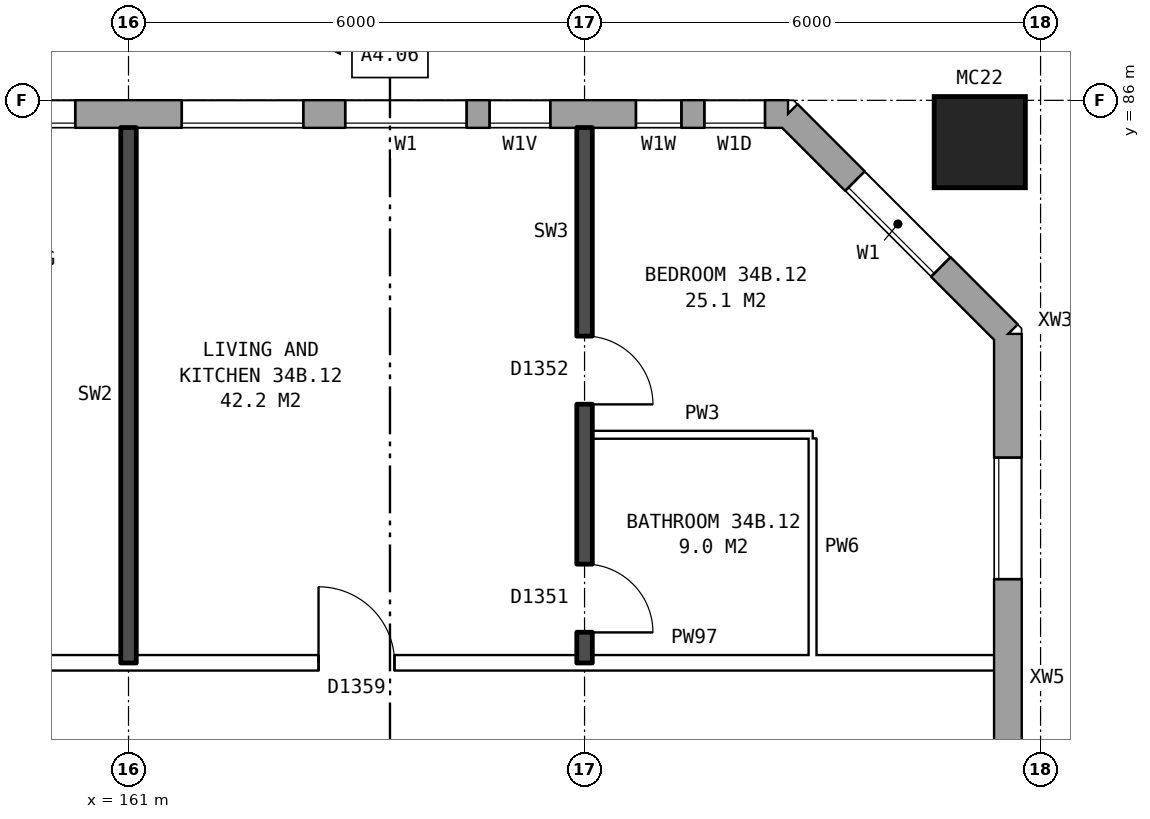
"""IFC4 building model, lengths in metres.
Left out: names, types, materials, properties, quantities, classifications, styles, units other than length and angle.
Written with IfcOpenShell. Run it as: python <this file> out.ifc"""

import sys

from ifc_helpers import new_model, si_unit, direction, frame, frame_2d, origin, origin_2d, place, context, subcontext, project, spatial, rectangle, hollow_rectangle, extrude, element, fill, save


model = new_model("IFC4")
c1 = context("Model", 3, precision=1e-05, world=origin(), true_north=direction((0.0, 1.0)))
c2 = subcontext(c1, "Body", "Model", "MODEL_VIEW")
j1 = project(units=[si_unit("LENGTHUNIT", "METRE"), si_unit("PLANEANGLEUNIT", "RADIAN")], contexts=[c1])
p1 = place(None, origin())
s1 = spatial("IfcSite", under=j1, at=p1, CompositionType="ELEMENT")
p2 = place(p1, origin())
s2 = spatial("IfcBuilding", under=s1, at=p2, CompositionType="ELEMENT")
p3 = place(p2, frame((0.0, 0.0, 123.7)))
s3 = spatial("IfcBuildingStorey", under=s2, at=p3, CompositionType="ELEMENT", Elevation=123.7)
p4 = place(p3, frame((172.2, 85.45, 0.0), z_axis=(0.0, 0.0, 1.0), x_axis=(1.0, 0.0, 0.0)))
e1 = element("IfcColumn", 1, at=p4, inside=s3, PredefinedType="COLUMN", context=c2, shape_type="SweptSolid", body=[
    extrude(hollow_rectangle(XDim=1.2, YDim=1.2, WallThickness=0.065, at=origin_2d()), origin(), (0.0, 0.0, 1.0), 3.1),
])
p5 = place(p3, frame((172.57, 57.075, 0.0), z_axis=(0.0, 0.0, 1.0), x_axis=(0.0, 1.0, 0.0)))
e2 = element("IfcWall", 2, at=p5, inside=s3, PredefinedType="STANDARD", context=c2, shape_type="SweptSolid", body=[
    extrude(rectangle(XDim=25.851, YDim=0.36, at=frame_2d((12.925, 0.0))), origin(), (0.0, 0.0, 1.0), 2.85),
])
p6 = place(p5, frame((1.625, 0.0, 0.8)))
e3 = element("IfcOpeningElement", 3, at=p6, cuts=e2, PredefinedType="OPENING", context=c2, shape_type="SweptSolid", body=[
    extrude(rectangle(XDim=1.6, YDim=1.8, at=frame_2d((0.8, 0.9))), frame((0.0, 0.19, 0.0), z_axis=(0.0, -1.0, 0.0), x_axis=(1.0, 0.0, 0.0)), (0.0, 0.0, 1.0), 0.38),
])
p7 = place(p5, frame((5.775, 0.0, 0.8)))
e4 = element("IfcOpeningElement", 4, at=p7, cuts=e2, PredefinedType="OPENING", context=c2, shape_type="SweptSolid", body=[
    extrude(rectangle(XDim=0.6, YDim=0.9, at=frame_2d((0.3, 0.45))), frame((0.0, 0.19, 0.0), z_axis=(0.0, -1.0, 0.0), x_axis=(1.0, 0.0, 0.0)), (0.0, 0.0, 1.0), 0.38),
])
p8 = place(p5, frame((7.625, 0.0, 0.8)))
e5 = element("IfcOpeningElement", 5, at=p8, cuts=e2, PredefinedType="OPENING", context=c2, shape_type="SweptSolid", body=[
    extrude(rectangle(XDim=1.6, YDim=1.8, at=frame_2d((0.8, 0.9))), frame((0.0, 0.19, 0.0), z_axis=(0.0, -1.0, 0.0), x_axis=(1.0, 0.0, 0.0)), (0.0, 0.0, 1.0), 0.38),
])
p9 = place(p5, frame((10.625, 0.0, 0.8)))
e6 = element("IfcOpeningElement", 6, at=p9, cuts=e2, PredefinedType="OPENING", context=c2, shape_type="SweptSolid", body=[
    extrude(rectangle(XDim=1.6, YDim=1.8, at=frame_2d((0.8, 0.9))), frame((0.0, 0.19, 0.0), z_axis=(0.0, -1.0, 0.0), x_axis=(1.0, 0.0, 0.0)), (0.0, 0.0, 1.0), 0.38),
])
p10 = place(p5, frame((13.625, 0.0, 0.8)))
e7 = element("IfcOpeningElement", 7, at=p10, cuts=e2, PredefinedType="OPENING", context=c2, shape_type="SweptSolid", body=[
    extrude(rectangle(XDim=1.6, YDim=1.8, at=frame_2d((0.8, 0.9))), frame((0.0, 0.19, 0.0), z_axis=(0.0, -1.0, 0.0), x_axis=(1.0, 0.0, 0.0)), (0.0, 0.0, 1.0), 0.38),
])
p11 = place(p5, frame((16.625, 0.0, 0.8)))
e8 = element("IfcOpeningElement", 8, at=p11, cuts=e2, PredefinedType="OPENING", context=c2, shape_type="SweptSolid", body=[
    extrude(rectangle(XDim=1.6, YDim=1.8, at=frame_2d((0.8, 0.9))), frame((0.0, 0.19, 0.0), z_axis=(0.0, -1.0, 0.0), x_axis=(1.0, 0.0, 0.0)), (0.0, 0.0, 1.0), 0.38),
])
p12 = place(p5, frame((6.675, 0.0, 0.8)))
e9 = element("IfcOpeningElement", 9, at=p12, cuts=e2, PredefinedType="OPENING", context=c2, shape_type="SweptSolid", body=[
    extrude(rectangle(XDim=0.6, YDim=1.5, at=frame_2d((0.3, 0.75))), frame((0.0, 0.19, 0.0), z_axis=(0.0, -1.0, 0.0), x_axis=(1.0, 0.0, 0.0)), (0.0, 0.0, 1.0), 0.38),
])
p13 = place(p5, frame((22.625, 0.0, 0.8)))
e10 = element("IfcOpeningElement", 10, at=p13, cuts=e2, PredefinedType="OPENING", context=c2, shape_type="SweptSolid", body=[
    extrude(rectangle(XDim=1.6, YDim=1.8, at=frame_2d((0.8, 0.9))), frame((0.0, 0.19, 0.0), z_axis=(0.0, -1.0, 0.0), x_axis=(1.0, 0.0, 0.0)), (0.0, 0.0, 1.0), 0.38),
])
p14 = place(p5, frame((9.525, 0.0, 0.8)))
e11 = element("IfcOpeningElement", 11, at=p14, cuts=e2, PredefinedType="OPENING", context=c2, shape_type="SweptSolid", body=[
    extrude(rectangle(XDim=0.8, YDim=1.8, at=frame_2d((0.4, 0.9))), frame((0.0, 0.19, 0.0), z_axis=(0.0, -1.0, 0.0), x_axis=(1.0, 0.0, 0.0)), (0.0, 0.0, 1.0), 0.38),
])
p15 = place(p5, frame((12.525, 0.0, 0.8)))
e12 = element("IfcOpeningElement", 12, at=p15, cuts=e2, PredefinedType="OPENING", context=c2, shape_type="SweptSolid", body=[
    extrude(rectangle(XDim=0.8, YDim=1.8, at=frame_2d((0.4, 0.9))), frame((0.0, 0.19, 0.0), z_axis=(0.0, -1.0, 0.0), x_axis=(1.0, 0.0, 0.0)), (0.0, 0.0, 1.0), 0.38),
])
p16 = place(p5, frame((15.525, 0.0, 0.8)))
e13 = element("IfcOpeningElement", 13, at=p16, cuts=e2, PredefinedType="OPENING", context=c2, shape_type="SweptSolid", body=[
    extrude(rectangle(XDim=0.8, YDim=1.8, at=frame_2d((0.4, 0.9))), frame((0.0, 0.19, 0.0), z_axis=(0.0, -1.0, 0.0), x_axis=(1.0, 0.0, 0.0)), (0.0, 0.0, 1.0), 0.38),
])
p17 = place(p5, frame((18.525, 0.0, 0.8)))
e14 = element("IfcOpeningElement", 14, at=p17, cuts=e2, PredefinedType="OPENING", context=c2, shape_type="SweptSolid", body=[
    extrude(rectangle(XDim=0.6, YDim=1.5, at=frame_2d((0.3, 0.75))), frame((0.0, 0.19, 0.0), z_axis=(0.0, -1.0, 0.0), x_axis=(1.0, 0.0, 0.0)), (0.0, 0.0, 1.0), 0.38),
])
p18 = place(p5, frame((19.425, 0.0, 0.8)))
e15 = element("IfcOpeningElement", 15, at=p18, cuts=e2, PredefinedType="OPENING", context=c2, shape_type="SweptSolid", body=[
    extrude(rectangle(XDim=0.6, YDim=0.9, at=frame_2d((0.3, 0.45))), frame((0.0, 0.19, 0.0), z_axis=(0.0, -1.0, 0.0), x_axis=(1.0, 0.0, 0.0)), (0.0, 0.0, 1.0), 0.38),
])
p19 = place(p3, frame((172.57, 82.925, 0.0), z_axis=(0.0, 0.0, 1.0), x_axis=(-0.707106781187, 0.707106781187, 0.0)))
e16 = element("IfcWall", 16, at=p19, inside=s3, PredefinedType="STANDARD", context=c2, shape_type="SweptSolid", body=[
    extrude(rectangle(XDim=4.094, YDim=0.36, at=frame_2d((2.047, 0.0))), origin(), (0.0, 0.0, 1.0), 2.85),
])
p20 = place(p19, frame((1.247, 0.0, 0.8)))
e17 = element("IfcOpeningElement", 17, at=p20, cuts=e16, PredefinedType="OPENING", context=c2, shape_type="SweptSolid", body=[
    extrude(rectangle(XDim=1.6, YDim=1.8, at=frame_2d((0.8, 0.9))), frame((0.0, 0.19, 0.0), z_axis=(0.0, -1.0, 0.0), x_axis=(1.0, 0.0, 0.0)), (0.0, 0.0, 1.0), 0.38),
])
p21 = place(p3, frame((169.675, 85.82, 0.0), z_axis=(0.0, 0.0, 1.0), x_axis=(-1.0, 0.0, 0.0)))
e18 = element("IfcWall", 18, at=p21, inside=s3, PredefinedType="STANDARD", context=c2, shape_type="SweptSolid", body=[
    extrude(rectangle(XDim=35.601, YDim=0.36, at=frame_2d((17.8, 0.0))), origin(), (0.0, 0.0, 1.0), 2.85),
])
p22 = place(p21, frame((0.3, 0.0, 0.8)))
e19 = element("IfcOpeningElement", 19, at=p22, cuts=e18, PredefinedType="OPENING", context=c2, shape_type="SweptSolid", body=[
    extrude(rectangle(XDim=0.8, YDim=1.8, at=frame_2d((0.4, 0.9))), frame((0.0, 0.19, 0.0), z_axis=(0.0, -1.0, 0.0), x_axis=(1.0, 0.0, 0.0)), (0.0, 0.0, 1.0), 0.38),
])
p23 = place(p21, frame((3.125, 0.0, 0.8)))
e20 = element("IfcOpeningElement", 20, at=p23, cuts=e18, PredefinedType="OPENING", context=c2, shape_type="SweptSolid", body=[
    extrude(rectangle(XDim=0.8, YDim=0.9, at=frame_2d((0.4, 0.45))), frame((0.0, 0.19, 0.0), z_axis=(0.0, -1.0, 0.0), x_axis=(1.0, 0.0, 0.0)), (0.0, 0.0, 1.0), 0.38),
])
p24 = place(p21, frame((6.375, 0.0, 0.8)))
e21 = element("IfcOpeningElement", 21, at=p24, cuts=e18, PredefinedType="OPENING", context=c2, shape_type="SweptSolid", body=[
    extrude(rectangle(XDim=1.6, YDim=1.8, at=frame_2d((0.8, 0.9))), frame((0.0, 0.19, 0.0), z_axis=(0.0, -1.0, 0.0), x_axis=(1.0, 0.0, 0.0)), (0.0, 0.0, 1.0), 0.38),
])
p25 = place(p21, frame((9.375, 0.0, 0.8)))
e22 = element("IfcOpeningElement", 22, at=p25, cuts=e18, PredefinedType="OPENING", context=c2, shape_type="SweptSolid", body=[
    extrude(rectangle(XDim=1.6, YDim=1.8, at=frame_2d((0.8, 0.9))), frame((0.0, 0.19, 0.0), z_axis=(0.0, -1.0, 0.0), x_axis=(1.0, 0.0, 0.0)), (0.0, 0.0, 1.0), 0.38),
])
p26 = place(p21, frame((12.375, 0.0, 0.8)))
e23 = element("IfcOpeningElement", 23, at=p26, cuts=e18, PredefinedType="OPENING", context=c2, shape_type="SweptSolid", body=[
    extrude(rectangle(XDim=1.6, YDim=1.8, at=frame_2d((0.8, 0.9))), frame((0.0, 0.19, 0.0), z_axis=(0.0, -1.0, 0.0), x_axis=(1.0, 0.0, 0.0)), (0.0, 0.0, 1.0), 0.38),
])
p27 = place(p21, frame((15.375, 0.0, 0.8)))
e24 = element("IfcOpeningElement", 24, at=p27, cuts=e18, PredefinedType="OPENING", context=c2, shape_type="SweptSolid", body=[
    extrude(rectangle(XDim=1.6, YDim=1.8, at=frame_2d((0.8, 0.9))), frame((0.0, 0.19, 0.0), z_axis=(0.0, -1.0, 0.0), x_axis=(1.0, 0.0, 0.0)), (0.0, 0.0, 1.0), 0.38),
])
p28 = place(p21, frame((18.375, 0.0, 0.8)))
e25 = element("IfcOpeningElement", 25, at=p28, cuts=e18, PredefinedType="OPENING", context=c2, shape_type="SweptSolid", body=[
    extrude(rectangle(XDim=1.6, YDim=1.8, at=frame_2d((0.8, 0.9))), frame((0.0, 0.19, 0.0), z_axis=(0.0, -1.0, 0.0), x_axis=(1.0, 0.0, 0.0)), (0.0, 0.0, 1.0), 0.38),
])
p29 = place(p21, frame((21.375, 0.0, 0.8)))
e26 = element("IfcOpeningElement", 26, at=p29, cuts=e18, PredefinedType="OPENING", context=c2, shape_type="SweptSolid", body=[
    extrude(rectangle(XDim=1.6, YDim=1.8, at=frame_2d((0.8, 0.9))), frame((0.0, 0.19, 0.0), z_axis=(0.0, -1.0, 0.0), x_axis=(1.0, 0.0, 0.0)), (0.0, 0.0, 1.0), 0.38),
])
p30 = place(p21, frame((24.375, 0.0, 0.8)))
e27 = element("IfcOpeningElement", 27, at=p30, cuts=e18, PredefinedType="OPENING", context=c2, shape_type="SweptSolid", body=[
    extrude(rectangle(XDim=1.6, YDim=1.8, at=frame_2d((0.8, 0.9))), frame((0.0, 0.19, 0.0), z_axis=(0.0, -1.0, 0.0), x_axis=(1.0, 0.0, 0.0)), (0.0, 0.0, 1.0), 0.38),
])
p31 = place(p21, frame((27.375, 0.0, 0.8)))
e28 = element("IfcOpeningElement", 28, at=p31, cuts=e18, PredefinedType="OPENING", context=c2, shape_type="SweptSolid", body=[
    extrude(rectangle(XDim=1.6, YDim=1.8, at=frame_2d((0.8, 0.9))), frame((0.0, 0.19, 0.0), z_axis=(0.0, -1.0, 0.0), x_axis=(1.0, 0.0, 0.0)), (0.0, 0.0, 1.0), 0.38),
])
p32 = place(p21, frame((29.275, 0.0, 0.8)))
e29 = element("IfcOpeningElement", 29, at=p32, cuts=e18, PredefinedType="OPENING", context=c2, shape_type="SweptSolid", body=[
    extrude(rectangle(XDim=1.4, YDim=1.8, at=frame_2d((0.7, 0.9))), frame((0.0, 0.19, 0.0), z_axis=(0.0, -1.0, 0.0), x_axis=(1.0, 0.0, 0.0)), (0.0, 0.0, 1.0), 0.38),
])
p33 = place(p21, frame((33.525, 0.0, 1.7)))
e30 = element("IfcOpeningElement", 30, at=p33, cuts=e18, PredefinedType="OPENING", context=c2, shape_type="SweptSolid", body=[
    extrude(rectangle(XDim=0.6, YDim=0.9, at=frame_2d((0.3, 0.45))), frame((0.0, 0.19, 0.0), z_axis=(0.0, -1.0, 0.0), x_axis=(1.0, 0.0, 0.0)), (0.0, 0.0, 1.0), 0.38),
])
p34 = place(p21, frame((1.4, 0.0, 1.6)))
e31 = element("IfcOpeningElement", 31, at=p34, cuts=e18, PredefinedType="OPENING", context=c2, shape_type="SweptSolid", body=[
    extrude(rectangle(XDim=0.6, YDim=0.9, at=frame_2d((0.3, 0.45))), frame((0.0, 0.19, 0.0), z_axis=(0.0, -1.0, 0.0), x_axis=(1.0, 0.0, 0.0)), (0.0, 0.0, 1.0), 0.38),
])
p35 = place(p21, frame((4.225, 0.0, 0.8)))
e32 = element("IfcOpeningElement", 32, at=p35, cuts=e18, PredefinedType="OPENING", context=c2, shape_type="SweptSolid", body=[
    extrude(rectangle(XDim=1.6, YDim=1.8, at=frame_2d((0.8, 0.9))), frame((0.0, 0.19, 0.0), z_axis=(0.0, -1.0, 0.0), x_axis=(1.0, 0.0, 0.0)), (0.0, 0.0, 1.0), 0.38),
])
p36 = place(p21, frame((30.975, 0.0, 0.8)))
e33 = element("IfcOpeningElement", 33, at=p36, cuts=e18, PredefinedType="OPENING", context=c2, shape_type="SweptSolid", body=[
    extrude(rectangle(XDim=0.8, YDim=1.5, at=frame_2d((0.4, 0.75))), frame((0.0, 0.19, 0.0), z_axis=(0.0, -1.0, 0.0), x_axis=(1.0, 0.0, 0.0)), (0.0, 0.0, 1.0), 0.38),
])
p37 = place(p21, frame((34.425, 0.0, 0.8)))
e34 = element("IfcOpeningElement", 34, at=p37, cuts=e18, PredefinedType="OPENING", context=c2, shape_type="SweptSolid", body=[
    extrude(rectangle(XDim=0.8, YDim=1.8, at=frame_2d((0.4, 0.9))), frame((0.0, 0.19, 0.0), z_axis=(0.0, -1.0, 0.0), x_axis=(1.0, 0.0, 0.0)), (0.0, 0.0, 1.0), 0.38),
])
p38 = place(p3, frame((155.1, 78.6, 0.0), z_axis=(0.0, 0.0, 1.0), x_axis=(1.0, 0.0, 0.0)))
e35 = element("IfcWall", 35, at=p38, inside=s3, PredefinedType="PARTITIONING", context=c2, shape_type="SweptSolid", body=[
    extrude(rectangle(XDim=17.29, YDim=0.2, at=frame_2d((8.645, 0.0))), origin(), (0.0, 0.0, 1.0), 2.85),
])
p39 = place(p38, frame((3.6, 0.0, 0.0)))
e36 = element("IfcOpeningElement", 36, at=p39, cuts=e35, PredefinedType="OPENING", context=c2, shape_type="SweptSolid", body=[
    extrude(rectangle(XDim=1.0, YDim=2.1, at=frame_2d((0.5, 1.05))), frame((0.0, 0.11, 0.0), z_axis=(0.0, -1.0, 0.0), x_axis=(1.0, 0.0, 0.0)), (0.0, 0.0, 1.0), 0.22),
])
p40 = place(p38, frame((8.4, 0.0, 0.0)))
e37 = element("IfcOpeningElement", 37, at=p40, cuts=e35, PredefinedType="OPENING", context=c2, shape_type="SweptSolid", body=[
    extrude(rectangle(XDim=1.0, YDim=2.1, at=frame_2d((0.5, 1.05))), frame((0.0, 0.11, 0.0), z_axis=(0.0, -1.0, 0.0), x_axis=(1.0, 0.0, 0.0)), (0.0, 0.0, 1.0), 0.22),
])
p41 = place(p3, frame((167.1, 81.6, 0.0), z_axis=(0.0, 0.0, 1.0), x_axis=(1.0, 0.0, 0.0)))
e38 = element("IfcWall", 38, at=p41, inside=s3, PredefinedType="PARTITIONING", context=c2, shape_type="SweptSolid", body=[
    extrude(rectangle(XDim=2.9, YDim=0.1, at=frame_2d((1.45, 0.0))), origin(), (0.0, 0.0, 1.0), 2.85),
])
p42 = place(p3, frame((161.0, 78.6, 0.0), z_axis=(0.0, 0.0, 1.0), x_axis=(0.0, 1.0, 0.0)))
e39 = element("IfcWall", 39, at=p42, inside=s3, PredefinedType="SOLIDWALL", context=c2, shape_type="SweptSolid", body=[
    extrude(rectangle(XDim=7.04, YDim=0.2, at=frame_2d((3.52, 0.0))), origin(), (0.0, 0.0, 1.0), 2.85),
])
p43 = place(p3, frame((167.0, 78.6, 0.0), z_axis=(0.0, 0.0, 1.0), x_axis=(0.0, 1.0, 0.0)))
e40 = element("IfcWall", 40, at=p43, inside=s3, PredefinedType="SOLIDWALL", context=c2, shape_type="SweptSolid", body=[
    extrude(rectangle(XDim=7.04, YDim=0.2, at=frame_2d((3.52, 0.0))), origin(), (0.0, 0.0, 1.0), 2.85),
])
p44 = place(p43, frame((3.4, 0.0, 0.0)))
e41 = element("IfcOpeningElement", 41, at=p44, cuts=e40, PredefinedType="OPENING", context=c2, shape_type="SweptSolid", body=[
    extrude(rectangle(XDim=0.9, YDim=2.1, at=frame_2d((0.45, 1.05))), frame((0.0, 0.11, 0.0), z_axis=(0.0, -1.0, 0.0), x_axis=(1.0, 0.0, 0.0)), (0.0, 0.0, 1.0), 0.22),
])
p45 = place(p43, frame((0.4, 0.0, 0.0)))
e42 = element("IfcOpeningElement", 42, at=p45, cuts=e40, PredefinedType="OPENING", context=c2, shape_type="SweptSolid", body=[
    extrude(rectangle(XDim=0.9, YDim=2.1, at=frame_2d((0.45, 1.05))), frame((0.0, 0.11, 0.0), z_axis=(0.0, -1.0, 0.0), x_axis=(1.0, 0.0, 0.0)), (0.0, 0.0, 1.0), 0.22),
])
p46 = place(p3, frame((170.0, 78.7, 0.0), z_axis=(0.0, 0.0, 1.0), x_axis=(0.0, 1.0, 0.0)))
e43 = element("IfcWall", 43, at=p46, inside=s3, PredefinedType="PARTITIONING", context=c2, shape_type="SweptSolid", body=[
    extrude(rectangle(XDim=2.85, YDim=0.1, at=frame_2d((1.425, 0.0))), origin(), (0.0, 0.0, 1.0), 2.85),
])
p47 = place(p13, origin())
e44 = element("IfcWindow", 44, at=p47, inside=s3, PartitioningType="SINGLE_PANEL", PredefinedType="WINDOW", context=c2, shape_type="SweptSolid", body=[
    extrude(rectangle(XDim=1.6, YDim=1.8, at=frame_2d((0.8, 0.9))), frame((0.0, 0.15, 0.0), z_axis=(0.0, -1.0, 0.0), x_axis=(1.0, 0.0, 0.0)), (0.0, 0.0, 1.0), 0.06),
])
fill(e10, e44)
p48 = place(p20, origin())
e45 = element("IfcWindow", 45, at=p48, inside=s3, PartitioningType="SINGLE_PANEL", PredefinedType="WINDOW", context=c2, shape_type="SweptSolid", body=[
    extrude(rectangle(XDim=1.6, YDim=1.8, at=frame_2d((0.8, 0.9))), frame((0.0, 0.15, 0.0), z_axis=(0.0, -1.0, 0.0), x_axis=(1.0, 0.0, 0.0)), (0.0, 0.0, 1.0), 0.06),
])
fill(e17, e45)
p49 = place(p22, origin())
e46 = element("IfcWindow", 46, at=p49, inside=s3, PartitioningType="SINGLE_PANEL", PredefinedType="WINDOW", context=c2, shape_type="SweptSolid", body=[
    extrude(rectangle(XDim=0.8, YDim=1.8, at=frame_2d((0.4, 0.9))), frame((0.0, 0.15, 0.0), z_axis=(0.0, -1.0, 0.0), x_axis=(1.0, 0.0, 0.0)), (0.0, 0.0, 1.0), 0.06),
])
fill(e19, e46)
p50 = place(p23, origin())
e47 = element("IfcWindow", 47, at=p50, inside=s3, PartitioningType="SINGLE_PANEL", PredefinedType="WINDOW", context=c2, shape_type="SweptSolid", body=[
    extrude(rectangle(XDim=0.8, YDim=0.9, at=frame_2d((0.4, 0.45))), frame((0.0, 0.15, 0.0), z_axis=(0.0, -1.0, 0.0), x_axis=(1.0, 0.0, 0.0)), (0.0, 0.0, 1.0), 0.06),
])
fill(e20, e47)
p51 = place(p24, origin())
e48 = element("IfcWindow", 48, at=p51, inside=s3, PartitioningType="SINGLE_PANEL", PredefinedType="WINDOW", context=c2, shape_type="SweptSolid", body=[
    extrude(rectangle(XDim=1.6, YDim=1.8, at=frame_2d((0.8, 0.9))), frame((0.0, 0.15, 0.0), z_axis=(0.0, -1.0, 0.0), x_axis=(1.0, 0.0, 0.0)), (0.0, 0.0, 1.0), 0.06),
])
fill(e21, e48)
p52 = place(p25, origin())
e49 = element("IfcWindow", 49, at=p52, inside=s3, PartitioningType="SINGLE_PANEL", PredefinedType="WINDOW", context=c2, shape_type="SweptSolid", body=[
    extrude(rectangle(XDim=1.6, YDim=1.8, at=frame_2d((0.8, 0.9))), frame((0.0, 0.15, 0.0), z_axis=(0.0, -1.0, 0.0), x_axis=(1.0, 0.0, 0.0)), (0.0, 0.0, 1.0), 0.06),
])
fill(e22, e49)
p53 = place(p44, frame((0.9, 0.0, 0.0), z_axis=(0.0, 0.0, 1.0), x_axis=(-1.0, 0.0, 0.0)))
e50 = element("IfcDoor", 50, at=p53, inside=s3, OperationType="SINGLE_SWING_RIGHT", PredefinedType="DOOR", context=c2, shape_type="SweptSolid", body=[
    extrude(rectangle(XDim=0.9, YDim=2.1, at=frame_2d((0.45, 1.05))), frame((0.0, 0.025, 0.0), z_axis=(0.0, -1.0, 0.0), x_axis=(1.0, 0.0, 0.0)), (0.0, 0.0, 1.0), 0.05),
])
fill(e41, e50)
p54 = place(p40, origin())
e51 = element("IfcDoor", 51, at=p54, inside=s3, OperationType="SINGLE_SWING_LEFT", PredefinedType="DOOR", context=c2, shape_type="SweptSolid", body=[
    extrude(rectangle(XDim=1.0, YDim=2.1, at=frame_2d((0.5, 1.05))), frame((0.0, 0.025, 0.0), z_axis=(0.0, -1.0, 0.0), x_axis=(1.0, 0.0, 0.0)), (0.0, 0.0, 1.0), 0.05),
])
fill(e37, e51)
p55 = place(p45, frame((0.9, 0.0, 0.0), z_axis=(0.0, 0.0, 1.0), x_axis=(-1.0, 0.0, 0.0)))
e52 = element("IfcDoor", 52, at=p55, inside=s3, OperationType="SINGLE_SWING_RIGHT", PredefinedType="DOOR", context=c2, shape_type="SweptSolid", body=[
    extrude(rectangle(XDim=0.9, YDim=2.1, at=frame_2d((0.45, 1.05))), frame((0.0, 0.025, 0.0), z_axis=(0.0, -1.0, 0.0), x_axis=(1.0, 0.0, 0.0)), (0.0, 0.0, 1.0), 0.05),
])
fill(e42, e52)
p56 = place(p34, origin())
e53 = element("IfcWindow", 53, at=p56, inside=s3, PartitioningType="SINGLE_PANEL", PredefinedType="WINDOW", context=c2, shape_type="SweptSolid", body=[
    extrude(rectangle(XDim=0.6, YDim=0.9, at=frame_2d((0.3, 0.45))), frame((0.0, 0.15, 0.0), z_axis=(0.0, -1.0, 0.0), x_axis=(1.0, 0.0, 0.0)), (0.0, 0.0, 1.0), 0.06),
])
fill(e31, e53)
p57 = place(p35, origin())
e54 = element("IfcWindow", 54, at=p57, inside=s3, PartitioningType="SINGLE_PANEL", PredefinedType="WINDOW", context=c2, shape_type="SweptSolid", body=[
    extrude(rectangle(XDim=1.6, YDim=1.8, at=frame_2d((0.8, 0.9))), frame((0.0, 0.15, 0.0), z_axis=(0.0, -1.0, 0.0), x_axis=(1.0, 0.0, 0.0)), (0.0, 0.0, 1.0), 0.06),
])
fill(e32, e54)
save(model, sys.argv[1])
